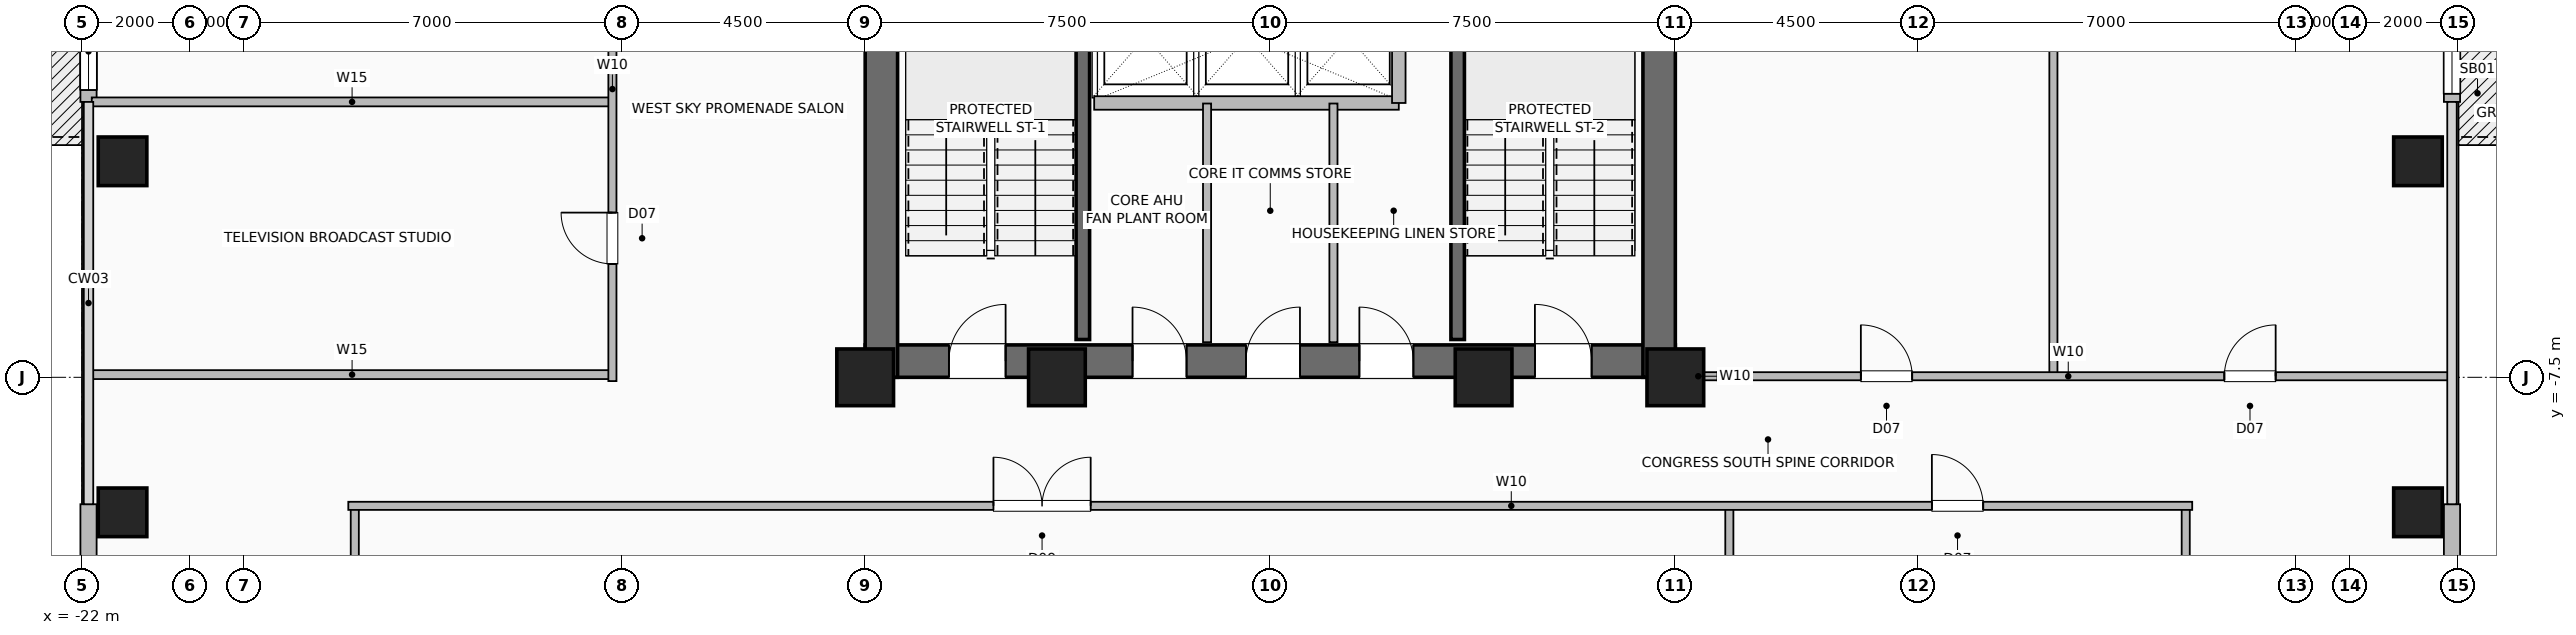
"""IFC4 building model, lengths in metres.
Left out: names, types, materials, properties, quantities, classifications, styles, units other than length and angle.
Written with IfcOpenShell. Run it as: python <this file> out.ifc"""

import sys

from ifc_helpers import new_model, si_unit, direction, frame, frame_2d, origin, origin_2d, place, context, subcontext, project, spatial, rectangle, hollow_rectangle, extrude, element, fill, save


model = new_model("IFC4")
c1 = context("Model", 3, precision=1e-05, world=origin(), true_north=direction((0.0, 1.0)))
c2 = subcontext(c1, "Body", "Model", "MODEL_VIEW")
j1 = project(units=[si_unit("LENGTHUNIT", "METRE"), si_unit("PLANEANGLEUNIT", "RADIAN")], contexts=[c1])
p1 = place(None, origin())
s1 = spatial("IfcSite", under=j1, at=p1, CompositionType="ELEMENT")
p2 = place(p1, origin())
s2 = spatial("IfcBuilding", under=s1, at=p2, CompositionType="ELEMENT")
p3 = place(p2, frame((0.0, 0.0, 144.4)))
s3 = spatial("IfcBuildingStorey", under=s2, at=p3, CompositionType="ELEMENT", Elevation=144.4)
for number, where, z_axis, x_axis in (
    (1, (-7.5, -7.5, 0.0), (0.0, 0.0, 1.0), (1.0, 0.0, 0.0)),
    (2, (-3.95, -7.5, 0.0), (0.0, 0.0, 1.0), (1.0, 0.0, 0.0)),
    (3, (3.95, -7.5, 0.0), (0.0, 0.0, 1.0), (1.0, 0.0, 0.0)),
    (4, (7.5, -7.5, 0.0), (0.0, 0.0, 1.0), (1.0, 0.0, 0.0)),
):
    element("IfcColumn", number, at=place(p3, frame(where, z_axis=z_axis, x_axis=x_axis)), inside=s3, PredefinedType="COLUMN", context=c2, shape_type="SweptSolid", body=[
        extrude(hollow_rectangle(XDim=1.05, YDim=1.05, WallThickness=0.05, at=origin_2d()), origin(), (0.0, 0.0, 1.0), 3.6),
    ])
for number, where, z_axis, x_axis in (
    (5, (-21.25, -10.0, 0.0), (0.0, 0.0, 1.0), (1.0, 0.0, 0.0)),
    (6, (21.25, -10.0, 0.0), (0.0, 0.0, 1.0), (1.0, 0.0, 0.0)),
    (7, (-21.25, -3.5, 0.0), (0.0, 0.0, 1.0), (1.0, 0.0, 0.0)),
    (8, (21.25, -3.5, 0.0), (0.0, 0.0, 1.0), (1.0, 0.0, 0.0)),
):
    element("IfcColumn", number, at=place(p3, frame(where, z_axis=z_axis, x_axis=x_axis)), inside=s3, PredefinedType="COLUMN", context=c2, shape_type="SweptSolid", body=[
        extrude(hollow_rectangle(XDim=0.9, YDim=0.9, WallThickness=0.045, at=origin_2d()), origin(), (0.0, 0.0, 1.0), 3.6),
    ])
p4 = place(p3, frame((-21.88, -16.15, 0.0), z_axis=(0.0, 0.0, 1.0), x_axis=(0.0, 1.0, 0.0)))
e9 = element("IfcWall", 9, at=p4, inside=s3, PredefinedType="SOLIDWALL", context=c2, shape_type="SweptSolid", body=[
    extrude(rectangle(XDim=6.3, YDim=0.3, at=frame_2d((3.15, 0.0))), origin(), (0.0, 0.0, 1.0), 3.36),
])
p5 = place(p3, frame((-21.88, -2.4, 0.0), z_axis=(0.0, 0.0, 1.0), x_axis=(0.0, 1.0, 0.0)))
e10 = element("IfcWall", 10, at=p5, inside=s3, PredefinedType="SOLIDWALL", context=c2, shape_type="SweptSolid", body=[
    extrude(rectangle(XDim=4.8, YDim=0.3, at=frame_2d((2.4, 0.0))), origin(), (0.0, 0.0, 1.0), 3.36),
])
p6 = place(p5, frame((1.85, 0.0, 0.0)))
e11 = element("IfcOpeningElement", 11, at=p6, cuts=e10, PredefinedType="OPENING", context=c2, shape_type="SweptSolid", body=[
    extrude(rectangle(XDim=1.1, YDim=2.2, at=frame_2d((0.55, 1.1))), frame((0.0, 0.16, 0.0), z_axis=(0.0, -1.0, 0.0), x_axis=(1.0, 0.0, 0.0)), (0.0, 0.0, 1.0), 0.32),
])
p7 = place(p5, frame((0.22, 0.0, 0.85)))
e12 = element("IfcOpeningElement", 12, at=p7, cuts=e10, PredefinedType="OPENING", context=c2, shape_type="SweptSolid", body=[
    extrude(rectangle(XDim=1.43, YDim=1.8, at=frame_2d((0.715, 0.9))), frame((0.0, 0.16, 0.0), z_axis=(0.0, -1.0, 0.0), x_axis=(1.0, 0.0, 0.0)), (0.0, 0.0, 1.0), 0.32),
])
p8 = place(p5, frame((3.15, 0.0, 0.85)))
e13 = element("IfcOpeningElement", 13, at=p8, cuts=e10, PredefinedType="OPENING", context=c2, shape_type="SweptSolid", body=[
    extrude(rectangle(XDim=1.5, YDim=1.8, at=frame_2d((0.75, 0.9))), frame((0.0, 0.16, 0.0), z_axis=(0.0, -1.0, 0.0), x_axis=(1.0, 0.0, 0.0)), (0.0, 0.0, 1.0), 0.32),
])
p9 = place(p3, frame((21.88, -16.15, 0.0), z_axis=(0.0, 0.0, 1.0), x_axis=(0.0, 1.0, 0.0)))
e14 = element("IfcWall", 14, at=p9, inside=s3, PredefinedType="SOLIDWALL", context=c2, shape_type="SweptSolid", body=[
    extrude(rectangle(XDim=6.3, YDim=0.3, at=frame_2d((3.15, 0.0))), origin(), (0.0, 0.0, 1.0), 3.36),
])
p10 = place(p3, frame((21.88, -2.4, 0.0), z_axis=(0.0, 0.0, 1.0), x_axis=(0.0, 1.0, 0.0)))
e15 = element("IfcWall", 15, at=p10, inside=s3, PredefinedType="SOLIDWALL", context=c2, shape_type="SweptSolid", body=[
    extrude(rectangle(XDim=4.8, YDim=0.3, at=frame_2d((2.4, 0.0))), origin(), (0.0, 0.0, 1.0), 3.36),
])
p11 = place(p10, frame((1.85, 0.0, 0.0)))
e16 = element("IfcOpeningElement", 16, at=p11, cuts=e15, PredefinedType="OPENING", context=c2, shape_type="SweptSolid", body=[
    extrude(rectangle(XDim=1.1, YDim=2.2, at=frame_2d((0.55, 1.1))), frame((0.0, 0.16, 0.0), z_axis=(0.0, -1.0, 0.0), x_axis=(1.0, 0.0, 0.0)), (0.0, 0.0, 1.0), 0.32),
])
p12 = place(p10, frame((0.15, 0.0, 0.85)))
e17 = element("IfcOpeningElement", 17, at=p12, cuts=e15, PredefinedType="OPENING", context=c2, shape_type="SweptSolid", body=[
    extrude(rectangle(XDim=1.5, YDim=1.8, at=frame_2d((0.75, 0.9))), frame((0.0, 0.16, 0.0), z_axis=(0.0, -1.0, 0.0), x_axis=(1.0, 0.0, 0.0)), (0.0, 0.0, 1.0), 0.32),
])
p13 = place(p10, frame((3.15, 0.0, 0.85)))
e18 = element("IfcOpeningElement", 18, at=p13, cuts=e15, PredefinedType="OPENING", context=c2, shape_type="SweptSolid", body=[
    extrude(rectangle(XDim=1.5, YDim=1.8, at=frame_2d((0.75, 0.9))), frame((0.0, 0.16, 0.0), z_axis=(0.0, -1.0, 0.0), x_axis=(1.0, 0.0, 0.0)), (0.0, 0.0, 1.0), 0.32),
])
p14 = place(p3, frame((-7.5, -7.2, 0.0), z_axis=(0.0, 0.0, 1.0), x_axis=(1.0, 0.0, 0.0)))
e19 = element("IfcWall", 19, at=p14, inside=s3, PredefinedType="SHEAR", context=c2, shape_type="SweptSolid", body=[
    extrude(rectangle(XDim=15.0, YDim=0.6, at=frame_2d((7.5, 0.0))), origin(), (0.0, 0.0, 1.0), 3.36),
])
p15 = place(p14, frame((1.55, 0.0, 0.0)))
e20 = element("IfcOpeningElement", 20, at=p15, cuts=e19, PredefinedType="OPENING", context=c2, shape_type="SweptSolid", body=[
    extrude(rectangle(XDim=1.05, YDim=2.08, at=frame_2d((0.525, 1.04))), frame((0.0, 0.31, 0.0), z_axis=(0.0, -1.0, 0.0), x_axis=(1.0, 0.0, 0.0)), (0.0, 0.0, 1.0), 0.62),
])
p16 = place(p14, frame((12.4, 0.0, 0.0)))
e21 = element("IfcOpeningElement", 21, at=p16, cuts=e19, PredefinedType="OPENING", context=c2, shape_type="SweptSolid", body=[
    extrude(rectangle(XDim=1.05, YDim=2.08, at=frame_2d((0.525, 1.04))), frame((0.0, 0.31, 0.0), z_axis=(0.0, -1.0, 0.0), x_axis=(1.0, 0.0, 0.0)), (0.0, 0.0, 1.0), 0.62),
])
p17 = place(p14, frame((4.95, 0.0, 0.0)))
e22 = element("IfcOpeningElement", 22, at=p17, cuts=e19, PredefinedType="OPENING", context=c2, shape_type="SweptSolid", body=[
    extrude(rectangle(XDim=1.0, YDim=2.08, at=frame_2d((0.5, 1.04))), frame((0.0, 0.31, 0.0), z_axis=(0.0, -1.0, 0.0), x_axis=(1.0, 0.0, 0.0)), (0.0, 0.0, 1.0), 0.62),
])
p18 = place(p14, frame((7.05, 0.0, 0.0)))
e23 = element("IfcOpeningElement", 23, at=p18, cuts=e19, PredefinedType="OPENING", context=c2, shape_type="SweptSolid", body=[
    extrude(rectangle(XDim=1.0, YDim=2.08, at=frame_2d((0.5, 1.04))), frame((0.0, 0.31, 0.0), z_axis=(0.0, -1.0, 0.0), x_axis=(1.0, 0.0, 0.0)), (0.0, 0.0, 1.0), 0.62),
])
p19 = place(p14, frame((9.15, 0.0, 0.0)))
e24 = element("IfcOpeningElement", 24, at=p19, cuts=e19, PredefinedType="OPENING", context=c2, shape_type="SweptSolid", body=[
    extrude(rectangle(XDim=1.0, YDim=2.08, at=frame_2d((0.5, 1.04))), frame((0.0, 0.31, 0.0), z_axis=(0.0, -1.0, 0.0), x_axis=(1.0, 0.0, 0.0)), (0.0, 0.0, 1.0), 0.62),
])
p20 = place(p3, frame((-7.2, -7.5, 0.0), z_axis=(0.0, 0.0, 1.0), x_axis=(0.0, 1.0, 0.0)))
e25 = element("IfcWall", 25, at=p20, inside=s3, PredefinedType="SHEAR", context=c2, shape_type="SweptSolid", body=[
    extrude(rectangle(XDim=15.0, YDim=0.6, at=frame_2d((7.5, 0.0))), origin(), (0.0, 0.0, 1.0), 3.36),
])
p21 = place(p20, frame((9.5, 0.0, 0.0)))
e26 = element("IfcOpeningElement", 26, at=p21, cuts=e25, PredefinedType="OPENING", context=c2, shape_type="SweptSolid", body=[
    extrude(rectangle(XDim=1.0, YDim=2.08, at=frame_2d((0.5, 1.04))), frame((0.0, 0.31, 0.0), z_axis=(0.0, -1.0, 0.0), x_axis=(1.0, 0.0, 0.0)), (0.0, 0.0, 1.0), 0.62),
])
p22 = place(p3, frame((7.2, -7.5, 0.0), z_axis=(0.0, 0.0, 1.0), x_axis=(0.0, 1.0, 0.0)))
e27 = element("IfcWall", 27, at=p22, inside=s3, PredefinedType="SHEAR", context=c2, shape_type="SweptSolid", body=[
    extrude(rectangle(XDim=15.0, YDim=0.6, at=frame_2d((7.5, 0.0))), origin(), (0.0, 0.0, 1.0), 3.36),
])
for number, where, z_axis, x_axis in (
    (28, (-3.47, -6.8, 0.0), (0.0, 0.0, 1.0), (0.0, 1.0, 0.0)),
    (29, (3.47, -6.8, 0.0), (0.0, 0.0, 1.0), (0.0, 1.0, 0.0)),
):
    element("IfcWall", number, at=place(p3, frame(where, z_axis=z_axis, x_axis=x_axis)), inside=s3, PredefinedType="SHEAR", context=c2, shape_type="SweptSolid", body=[
        extrude(rectangle(XDim=7.72, YDim=0.25, at=frame_2d((3.86, 0.0))), origin(), (0.0, 0.0, 1.0), 3.36),
    ])
p23 = place(p3, frame((-3.26, -2.42, 0.0), z_axis=(0.0, 0.0, 1.0), x_axis=(1.0, 0.0, 0.0)))
e30 = element("IfcWall", 30, at=p23, inside=s3, PredefinedType="SHEAR", context=c2, shape_type="SweptSolid", body=[
    extrude(rectangle(XDim=5.64, YDim=0.25, at=frame_2d((2.82, 0.0))), origin(), (0.0, 0.0, 1.0), 3.36),
])
p24 = place(p3, frame((2.38, -2.42, 0.0), z_axis=(0.0, 0.0, 1.0), x_axis=(0.0, 1.0, 0.0)))
e31 = element("IfcWall", 31, at=p24, inside=s3, PredefinedType="SHEAR", context=c2, shape_type="SweptSolid", body=[
    extrude(rectangle(XDim=2.44, YDim=0.25, at=frame_2d((1.22, 0.0))), origin(), (0.0, 0.0, 1.0), 3.36),
])
for number, where, z_axis, x_axis in (
    (32, (-1.17, -6.85, 0.0), (0.0, 0.0, 1.0), (0.0, 1.0, 0.0)),
    (33, (1.17, -6.85, 0.0), (0.0, 0.0, 1.0), (0.0, 1.0, 0.0)),
):
    element("IfcWall", number, at=place(p3, frame(where, z_axis=z_axis, x_axis=x_axis)), inside=s3, PredefinedType="PARTITIONING", context=c2, shape_type="SweptSolid", body=[
        extrude(rectangle(XDim=4.42, YDim=0.15, at=frame_2d((2.21, 0.0))), origin(), (0.0, 0.0, 1.0), 3.36),
    ])
for number, where, z_axis, x_axis in (
    (34, (-16.95, -21.82, 0.0), (0.0, 0.0, 1.0), (0.0, 1.0, 0.0)),
    (35, (8.5, -21.82, 0.0), (0.0, 0.0, 1.0), (0.0, 1.0, 0.0)),
    (36, (16.95, -21.82, 0.0), (0.0, 0.0, 1.0), (0.0, 1.0, 0.0)),
):
    element("IfcWall", number, at=place(p3, frame(where, z_axis=z_axis, x_axis=x_axis)), inside=s3, PredefinedType="PARTITIONING", context=c2, shape_type="SweptSolid", body=[
        extrude(rectangle(XDim=11.94, YDim=0.15, at=frame_2d((5.97, 0.0))), origin(), (0.0, 0.0, 1.0), 3.36),
    ])
p25 = place(p3, frame((-17.07, -9.88, 0.0), z_axis=(0.0, 0.0, 1.0), x_axis=(1.0, 0.0, 0.0)))
e37 = element("IfcWall", 37, at=p25, inside=s3, PredefinedType="PARTITIONING", context=c2, shape_type="SweptSolid", body=[
    extrude(rectangle(XDim=34.14, YDim=0.15, at=frame_2d((17.07, 0.0))), origin(), (0.0, 0.0, 1.0), 3.36),
])
p26 = place(p25, frame((11.945, 0.0, 0.0)))
e38 = element("IfcOpeningElement", 38, at=p26, cuts=e37, PredefinedType="OPENING", context=c2, shape_type="SweptSolid", body=[
    extrude(rectangle(XDim=1.8, YDim=2.08, at=frame_2d((0.9, 1.04))), frame((0.0, 0.085, 0.0), z_axis=(0.0, -1.0, 0.0), x_axis=(1.0, 0.0, 0.0)), (0.0, 0.0, 1.0), 0.17),
])
p27 = place(p25, frame((29.32, 0.0, 0.0)))
e39 = element("IfcOpeningElement", 39, at=p27, cuts=e37, PredefinedType="OPENING", context=c2, shape_type="SweptSolid", body=[
    extrude(rectangle(XDim=0.95, YDim=2.06, at=frame_2d((0.475, 1.03))), frame((0.0, 0.085, 0.0), z_axis=(0.0, -1.0, 0.0), x_axis=(1.0, 0.0, 0.0)), (0.0, 0.0, 1.0), 0.17),
])
for number, where, z_axis, x_axis in (
    (40, (-21.82, -7.45, 0.0), (0.0, 0.0, 1.0), (1.0, 0.0, 0.0)),
    (41, (-21.82, -2.4, 0.0), (0.0, 0.0, 1.0), (1.0, 0.0, 0.0)),
):
    element("IfcWall", number, at=place(p3, frame(where, z_axis=z_axis, x_axis=x_axis)), inside=s3, PredefinedType="PLUMBINGWALL", context=c2, shape_type="SweptSolid", body=[
        extrude(rectangle(XDim=9.64, YDim=0.165, at=frame_2d((4.82, 0.0))), origin(), (0.0, 0.0, 1.0), 3.36),
    ])
p28 = place(p3, frame((-12.18, -7.57, 0.0), z_axis=(0.0, 0.0, 1.0), x_axis=(0.0, 1.0, 0.0)))
e42 = element("IfcWall", 42, at=p28, inside=s3, PredefinedType="PARTITIONING", context=c2, shape_type="SweptSolid", body=[
    extrude(rectangle(XDim=15.14, YDim=0.15, at=frame_2d((7.57, 0.0))), origin(), (0.0, 0.0, 1.0), 3.36),
])
p29 = place(p28, frame((2.17, 0.0, 0.0)))
e43 = element("IfcOpeningElement", 43, at=p29, cuts=e42, PredefinedType="OPENING", context=c2, shape_type="SweptSolid", body=[
    extrude(rectangle(XDim=0.95, YDim=2.06, at=frame_2d((0.475, 1.03))), frame((0.0, 0.085, 0.0), z_axis=(0.0, -1.0, 0.0), x_axis=(1.0, 0.0, 0.0)), (0.0, 0.0, 1.0), 0.17),
])
p30 = place(p28, frame((7.695, 0.0, 0.0)))
e44 = element("IfcOpeningElement", 44, at=p30, cuts=e42, PredefinedType="OPENING", context=c2, shape_type="SweptSolid", body=[
    extrude(rectangle(XDim=0.95, YDim=2.06, at=frame_2d((0.475, 1.03))), frame((0.0, 0.085, 0.0), z_axis=(0.0, -1.0, 0.0), x_axis=(1.0, 0.0, 0.0)), (0.0, 0.0, 1.0), 0.17),
])
p31 = place(p28, frame((11.615, 0.0, 0.0)))
e45 = element("IfcOpeningElement", 45, at=p31, cuts=e42, PredefinedType="OPENING", context=c2, shape_type="SweptSolid", body=[
    extrude(rectangle(XDim=0.85, YDim=2.05, at=frame_2d((0.425, 1.025))), frame((0.0, 0.085, 0.0), z_axis=(0.0, -1.0, 0.0), x_axis=(1.0, 0.0, 0.0)), (0.0, 0.0, 1.0), 0.17),
])
p32 = place(p28, frame((13.49, 0.0, 0.0)))
e46 = element("IfcOpeningElement", 46, at=p32, cuts=e42, PredefinedType="OPENING", context=c2, shape_type="SweptSolid", body=[
    extrude(rectangle(XDim=0.95, YDim=2.06, at=frame_2d((0.475, 1.03))), frame((0.0, 0.085, 0.0), z_axis=(0.0, -1.0, 0.0), x_axis=(1.0, 0.0, 0.0)), (0.0, 0.0, 1.0), 0.17),
])
p33 = place(p3, frame((7.45, -7.48, 0.0), z_axis=(0.0, 0.0, 1.0), x_axis=(1.0, 0.0, 0.0)))
e47 = element("IfcWall", 47, at=p33, inside=s3, PredefinedType="PARTITIONING", context=c2, shape_type="SweptSolid", body=[
    extrude(rectangle(XDim=0.95, YDim=0.15, at=frame_2d((0.475, 0.0))), origin(), (0.0, 0.0, 1.0), 3.36),
])
p34 = place(p3, frame((14.5, -7.48, 0.0), z_axis=(0.0, 0.0, 1.0), x_axis=(0.0, 1.0, 0.0)))
e48 = element("IfcWall", 48, at=p34, inside=s3, PredefinedType="PARTITIONING", context=c2, shape_type="SweptSolid", body=[
    extrude(rectangle(XDim=14.88, YDim=0.15, at=frame_2d((7.44, 0.0))), origin(), (0.0, 0.0, 1.0), 3.36),
])
p35 = place(p3, frame((8.28, -7.48, 0.0), z_axis=(0.0, 0.0, 1.0), x_axis=(1.0, 0.0, 0.0)))
e49 = element("IfcWall", 49, at=p35, inside=s3, PredefinedType="PARTITIONING", context=c2, shape_type="SweptSolid", body=[
    extrude(rectangle(XDim=13.54, YDim=0.15, at=frame_2d((6.77, 0.0))), origin(), (0.0, 0.0, 1.0), 3.36),
])
p36 = place(p35, frame((2.655, 0.0, 0.0)))
e50 = element("IfcOpeningElement", 50, at=p36, cuts=e49, PredefinedType="OPENING", context=c2, shape_type="SweptSolid", body=[
    extrude(rectangle(XDim=0.95, YDim=2.06, at=frame_2d((0.475, 1.03))), frame((0.0, 0.085, 0.0), z_axis=(0.0, -1.0, 0.0), x_axis=(1.0, 0.0, 0.0)), (0.0, 0.0, 1.0), 0.17),
])
p37 = place(p35, frame((9.385, 0.0, 0.0)))
e51 = element("IfcOpeningElement", 51, at=p37, cuts=e49, PredefinedType="OPENING", context=c2, shape_type="SweptSolid", body=[
    extrude(rectangle(XDim=0.95, YDim=2.06, at=frame_2d((0.475, 1.03))), frame((0.0, 0.085, 0.0), z_axis=(0.0, -1.0, 0.0), x_axis=(1.0, 0.0, 0.0)), (0.0, 0.0, 1.0), 0.17),
])
p38 = place(p7, origin())
e52 = element("IfcWindow", 52, at=p38, inside=s3, PartitioningType="SINGLE_PANEL", PredefinedType="WINDOW", context=c2, shape_type="SweptSolid", body=[
    extrude(rectangle(XDim=1.43, YDim=1.8, at=frame_2d((0.715, 0.9))), frame((0.0, 0.03, 0.0), z_axis=(0.0, -1.0, 0.0), x_axis=(1.0, 0.0, 0.0)), (0.0, 0.0, 1.0), 0.06),
])
fill(e12, e52)
p39 = place(p12, origin())
e53 = element("IfcWindow", 53, at=p39, inside=s3, PartitioningType="SINGLE_PANEL", PredefinedType="WINDOW", context=c2, shape_type="SweptSolid", body=[
    extrude(rectangle(XDim=1.5, YDim=1.8, at=frame_2d((0.75, 0.9))), frame((0.0, 0.03, 0.0), z_axis=(0.0, -1.0, 0.0), x_axis=(1.0, 0.0, 0.0)), (0.0, 0.0, 1.0), 0.06),
])
fill(e17, e53)
p40 = place(p15, origin())
e54 = element("IfcDoor", 54, at=p40, inside=s3, OperationType="SINGLE_SWING_RIGHT", PredefinedType="DOOR", context=c2, shape_type="SweptSolid", body=[
    extrude(rectangle(XDim=1.05, YDim=2.08, at=frame_2d((0.525, 1.04))), frame((0.0, 0.025, 0.0), z_axis=(0.0, -1.0, 0.0), x_axis=(1.0, 0.0, 0.0)), (0.0, 0.0, 1.0), 0.05),
])
fill(e20, e54)
p41 = place(p16, origin())
e55 = element("IfcDoor", 55, at=p41, inside=s3, OperationType="SINGLE_SWING_LEFT", PredefinedType="DOOR", context=c2, shape_type="SweptSolid", body=[
    extrude(rectangle(XDim=1.05, YDim=2.08, at=frame_2d((0.525, 1.04))), frame((0.0, 0.025, 0.0), z_axis=(0.0, -1.0, 0.0), x_axis=(1.0, 0.0, 0.0)), (0.0, 0.0, 1.0), 0.05),
])
fill(e21, e55)
p42 = place(p17, origin())
e56 = element("IfcDoor", 56, at=p42, inside=s3, OperationType="SINGLE_SWING_LEFT", PredefinedType="DOOR", context=c2, shape_type="SweptSolid", body=[
    extrude(rectangle(XDim=1.0, YDim=2.08, at=frame_2d((0.5, 1.04))), frame((0.0, 0.025, 0.0), z_axis=(0.0, -1.0, 0.0), x_axis=(1.0, 0.0, 0.0)), (0.0, 0.0, 1.0), 0.05),
])
fill(e22, e56)
p43 = place(p18, origin())
e57 = element("IfcDoor", 57, at=p43, inside=s3, OperationType="SINGLE_SWING_RIGHT", PredefinedType="DOOR", context=c2, shape_type="SweptSolid", body=[
    extrude(rectangle(XDim=1.0, YDim=2.08, at=frame_2d((0.5, 1.04))), frame((0.0, 0.025, 0.0), z_axis=(0.0, -1.0, 0.0), x_axis=(1.0, 0.0, 0.0)), (0.0, 0.0, 1.0), 0.05),
])
fill(e23, e57)
p44 = place(p19, origin())
e58 = element("IfcDoor", 58, at=p44, inside=s3, OperationType="SINGLE_SWING_LEFT", PredefinedType="DOOR", context=c2, shape_type="SweptSolid", body=[
    extrude(rectangle(XDim=1.0, YDim=2.08, at=frame_2d((0.5, 1.04))), frame((0.0, 0.025, 0.0), z_axis=(0.0, -1.0, 0.0), x_axis=(1.0, 0.0, 0.0)), (0.0, 0.0, 1.0), 0.05),
])
fill(e24, e58)
p45 = place(p26, origin())
e59 = element("IfcDoor", 59, at=p45, inside=s3, OperationType="DOUBLE_DOOR_SINGLE_SWING", PredefinedType="DOOR", context=c2, shape_type="SweptSolid", body=[
    extrude(rectangle(XDim=1.8, YDim=2.08, at=frame_2d((0.9, 1.04))), frame((0.0, 0.025, 0.0), z_axis=(0.0, -1.0, 0.0), x_axis=(1.0, 0.0, 0.0)), (0.0, 0.0, 1.0), 0.05),
])
fill(e38, e59)
p46 = place(p27, origin())
e60 = element("IfcDoor", 60, at=p46, inside=s3, OperationType="SINGLE_SWING_LEFT", PredefinedType="DOOR", context=c2, shape_type="SweptSolid", body=[
    extrude(rectangle(XDim=0.95, YDim=2.06, at=frame_2d((0.475, 1.03))), frame((0.0, 0.025, 0.0), z_axis=(0.0, -1.0, 0.0), x_axis=(1.0, 0.0, 0.0)), (0.0, 0.0, 1.0), 0.05),
])
fill(e39, e60)
p47 = place(p29, origin())
e61 = element("IfcDoor", 61, at=p47, inside=s3, OperationType="SINGLE_SWING_RIGHT", PredefinedType="DOOR", context=c2, shape_type="SweptSolid", body=[
    extrude(rectangle(XDim=0.95, YDim=2.06, at=frame_2d((0.475, 1.03))), frame((0.0, 0.025, 0.0), z_axis=(0.0, -1.0, 0.0), x_axis=(1.0, 0.0, 0.0)), (0.0, 0.0, 1.0), 0.05),
])
fill(e43, e61)
p48 = place(p36, origin())
e62 = element("IfcDoor", 62, at=p48, inside=s3, OperationType="SINGLE_SWING_LEFT", PredefinedType="DOOR", context=c2, shape_type="SweptSolid", body=[
    extrude(rectangle(XDim=0.95, YDim=2.06, at=frame_2d((0.475, 1.03))), frame((0.0, 0.025, 0.0), z_axis=(0.0, -1.0, 0.0), x_axis=(1.0, 0.0, 0.0)), (0.0, 0.0, 1.0), 0.05),
])
fill(e50, e62)
p49 = place(p37, origin())
e63 = element("IfcDoor", 63, at=p49, inside=s3, OperationType="SINGLE_SWING_RIGHT", PredefinedType="DOOR", context=c2, shape_type="SweptSolid", body=[
    extrude(rectangle(XDim=0.95, YDim=2.06, at=frame_2d((0.475, 1.03))), frame((0.0, 0.025, 0.0), z_axis=(0.0, -1.0, 0.0), x_axis=(1.0, 0.0, 0.0)), (0.0, 0.0, 1.0), 0.05),
])
fill(e51, e63)
save(model, sys.argv[1])
